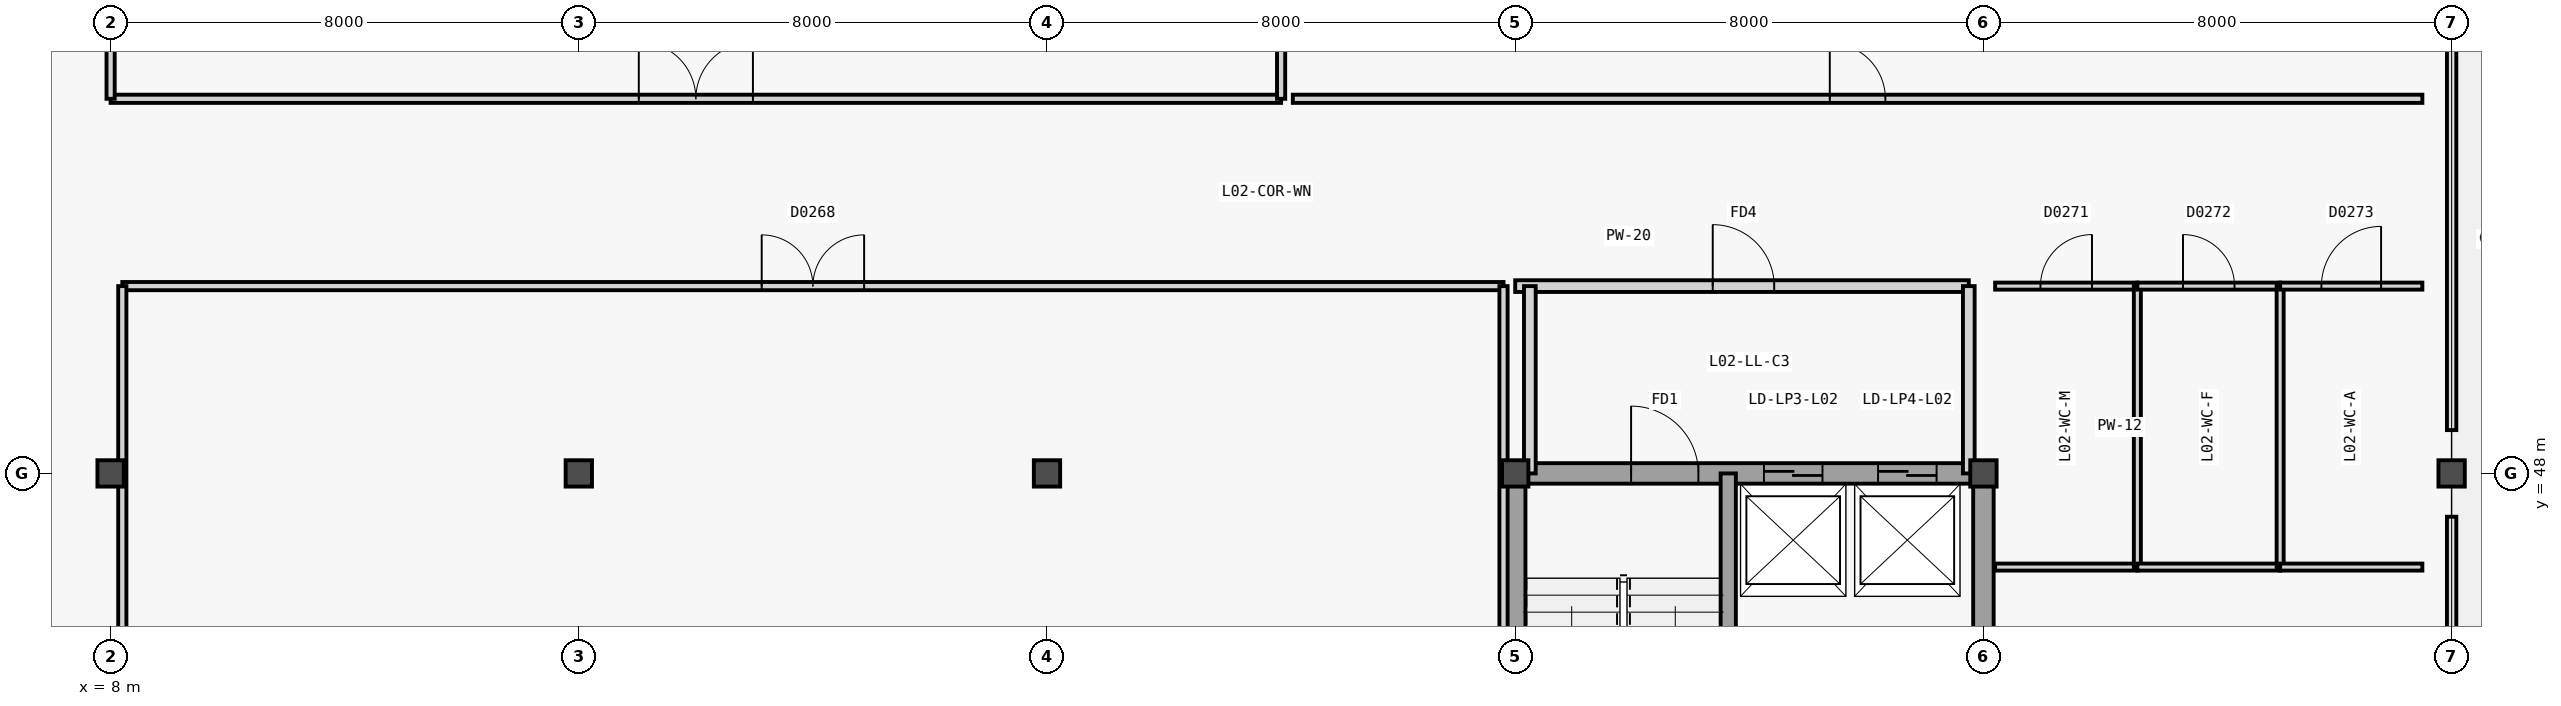
"""IFC4 building model, lengths in metres.
Left out: names, types, materials, properties, quantities, classifications, styles, units other than length and angle.
Written with IfcOpenShell. Run it as: python <this file> out.ifc"""

import sys

from ifc_helpers import new_model, si_unit, direction, frame, frame_2d, origin, origin_2d, place, context, subcontext, project, spatial, rectangle, extrude, element, fill, save


model = new_model("IFC4")
c1 = context("Model", 3, precision=1e-05, world=origin(), true_north=direction((0.0, 1.0)))
c2 = subcontext(c1, "Body", "Model", "MODEL_VIEW")
j1 = project(units=[si_unit("LENGTHUNIT", "METRE"), si_unit("PLANEANGLEUNIT", "RADIAN")], contexts=[c1])
p1 = place(None, origin())
s1 = spatial("IfcSite", under=j1, at=p1, CompositionType="ELEMENT")
p2 = place(p1, origin())
s2 = spatial("IfcBuilding", under=s1, at=p2, CompositionType="ELEMENT")
p3 = place(p2, frame((0.0, 0.0, 10.2)))
s3 = spatial("IfcBuildingStorey", under=s2, at=p3, CompositionType="ELEMENT", Elevation=10.2)
for number, where, z_axis, x_axis in (
    (1, (8.0, 48.0, 0.0), (0.0, 0.0, 1.0), (1.0, 0.0, 0.0)),
    (2, (16.0, 48.0, 0.0), (0.0, 0.0, 1.0), (1.0, 0.0, 0.0)),
    (3, (24.0, 48.0, 0.0), (0.0, 0.0, 1.0), (1.0, 0.0, 0.0)),
    (4, (32.0, 48.0, 0.0), (0.0, 0.0, 1.0), (1.0, 0.0, 0.0)),
    (5, (40.0, 48.0, 0.0), (0.0, 0.0, 1.0), (1.0, 0.0, 0.0)),
    (6, (48.0, 48.0, 0.0), (0.0, 0.0, 1.0), (1.0, 0.0, 0.0)),
):
    element("IfcColumn", number, at=place(p3, frame(where, z_axis=z_axis, x_axis=x_axis)), inside=s3, PredefinedType="COLUMN", context=c2, shape_type="SweptSolid", body=[
        extrude(rectangle(XDim=0.45, YDim=0.45, at=origin_2d()), origin(), (0.0, 0.0, 1.0), 4.2),
    ])
for number, where, z_axis, x_axis in (
    (7, (32.0, 40.0, 0.0), (0.0, 0.0, 1.0), (0.0, 1.0, 0.0)),
    (8, (40.0, 40.0, 0.0), (0.0, 0.0, 1.0), (0.0, 1.0, 0.0)),
):
    element("IfcWall", number, at=place(p3, frame(where, z_axis=z_axis, x_axis=x_axis)), inside=s3, PredefinedType="SHEAR", context=c2, shape_type="SweptSolid", body=[
        extrude(rectangle(XDim=8.0, YDim=0.35, at=frame_2d((4.0, 0.0))), origin(), (0.0, 0.0, 1.0), 4.2),
    ])
p4 = place(p3, frame((32.0, 48.0, 0.0), z_axis=(0.0, 0.0, 1.0), x_axis=(1.0, 0.0, 0.0)))
e9 = element("IfcWall", 9, at=p4, inside=s3, PredefinedType="SHEAR", context=c2, shape_type="SweptSolid", body=[
    extrude(rectangle(XDim=8.0, YDim=0.35, at=frame_2d((4.0, 0.0))), origin(), (0.0, 0.0, 1.0), 4.2),
])
p5 = place(p4, frame((1.98, 0.0, 0.0)))
e10 = element("IfcOpeningElement", 10, at=p5, cuts=e9, PredefinedType="OPENING", context=c2, shape_type="SweptSolid", body=[
    extrude(rectangle(XDim=1.15, YDim=2.2, at=frame_2d((0.575, 1.1))), frame((0.0, 0.185, 0.0), z_axis=(0.0, -1.0, 0.0), x_axis=(1.0, 0.0, 0.0)), (0.0, 0.0, 1.0), 0.37),
])
p6 = place(p4, frame((4.25, 0.0, 0.0)))
e11 = element("IfcOpeningElement", 11, at=p6, cuts=e9, PredefinedType="OPENING", context=c2, shape_type="SweptSolid", body=[
    extrude(rectangle(XDim=1.0, YDim=2.15, at=frame_2d((0.5, 1.075))), frame((0.0, 0.185, 0.0), z_axis=(0.0, -1.0, 0.0), x_axis=(1.0, 0.0, 0.0)), (0.0, 0.0, 1.0), 0.37),
])
p7 = place(p4, frame((6.2, 0.0, 0.0)))
e12 = element("IfcOpeningElement", 12, at=p7, cuts=e9, PredefinedType="OPENING", context=c2, shape_type="SweptSolid", body=[
    extrude(rectangle(XDim=1.0, YDim=2.15, at=frame_2d((0.5, 1.075))), frame((0.0, 0.185, 0.0), z_axis=(0.0, -1.0, 0.0), x_axis=(1.0, 0.0, 0.0)), (0.0, 0.0, 1.0), 0.37),
])
p8 = place(p3, frame((35.64, 40.0, 0.0), z_axis=(0.0, 0.0, 1.0), x_axis=(0.0, 1.0, 0.0)))
e13 = element("IfcWall", 13, at=p8, inside=s3, PredefinedType="SHEAR", context=c2, shape_type="SweptSolid", body=[
    extrude(rectangle(XDim=8.0, YDim=0.26, at=frame_2d((4.0, 0.0))), origin(), (0.0, 0.0, 1.0), 4.2),
])
p9 = place(p3, frame((32.0, 51.2, 0.0), z_axis=(0.0, 0.0, 1.0), x_axis=(1.0, 0.0, 0.0)))
e14 = element("IfcWall", 14, at=p9, inside=s3, PredefinedType="PARTITIONING", context=c2, shape_type="SweptSolid", body=[
    extrude(rectangle(XDim=7.75, YDim=0.2, at=frame_2d((3.875, 0.0))), origin(), (0.0, 0.0, 1.0), 3.92),
])
p10 = place(p9, frame((3.375, 0.0, 0.0)))
e15 = element("IfcOpeningElement", 15, at=p10, cuts=e14, PredefinedType="OPENING", context=c2, shape_type="SweptSolid", body=[
    extrude(rectangle(XDim=1.05, YDim=2.15, at=frame_2d((0.525, 1.075))), frame((0.0, 0.11, 0.0), z_axis=(0.0, -1.0, 0.0), x_axis=(1.0, 0.0, 0.0)), (0.0, 0.0, 1.0), 0.22),
])
for number, where, z_axis, x_axis in (
    (16, (39.75, 48.0, 0.0), (0.0, 0.0, 1.0), (0.0, 1.0, 0.0)),
    (17, (32.25, 48.0, 0.0), (0.0, 0.0, 1.0), (0.0, 1.0, 0.0)),
):
    element("IfcWall", number, at=place(p3, frame(where, z_axis=z_axis, x_axis=x_axis)), inside=s3, PredefinedType="PARTITIONING", context=c2, shape_type="SweptSolid", body=[
        extrude(rectangle(XDim=3.2, YDim=0.2, at=frame_2d((1.6, 0.0))), origin(), (0.0, 0.0, 1.0), 3.36),
    ])
p11 = place(p3, frame((8.2, 51.2, 0.0), z_axis=(0.0, 0.0, 1.0), x_axis=(1.0, 0.0, 0.0)))
e18 = element("IfcWall", 18, at=p11, inside=s3, PredefinedType="PARTITIONING", context=c2, shape_type="SweptSolid", body=[
    extrude(rectangle(XDim=23.6, YDim=0.14, at=frame_2d((11.8, 0.0))), origin(), (0.0, 0.0, 1.0), 3.94),
])
p12 = place(p11, frame((10.925, 0.0, 0.0)))
e19 = element("IfcOpeningElement", 19, at=p12, cuts=e18, PredefinedType="OPENING", context=c2, shape_type="SweptSolid", body=[
    extrude(rectangle(XDim=1.75, YDim=2.2, at=frame_2d((0.875, 1.1))), frame((0.0, 0.08, 0.0), z_axis=(0.0, -1.0, 0.0), x_axis=(1.0, 0.0, 0.0)), (0.0, 0.0, 1.0), 0.16),
])
for number, where, z_axis, x_axis in (
    (20, (8.2, 32.2, 0.0), (0.0, 0.0, 1.0), (0.0, 1.0, 0.0)),
    (21, (31.8, 32.2, 0.0), (0.0, 0.0, 1.0), (0.0, 1.0, 0.0)),
):
    element("IfcWall", number, at=place(p3, frame(where, z_axis=z_axis, x_axis=x_axis)), inside=s3, PredefinedType="PARTITIONING", context=c2, shape_type="SweptSolid", body=[
        extrude(rectangle(XDim=19.0, YDim=0.14, at=frame_2d((9.5, 0.0))), origin(), (0.0, 0.0, 1.0), 3.36),
    ])
p13 = place(p3, frame((8.0, 54.4, 0.0), z_axis=(0.0, 0.0, 1.0), x_axis=(1.0, 0.0, 0.0)))
e22 = element("IfcWall", 22, at=p13, inside=s3, PredefinedType="PARTITIONING", context=c2, shape_type="SweptSolid", body=[
    extrude(rectangle(XDim=20.0, YDim=0.14, at=frame_2d((10.0, 0.0))), origin(), (0.0, 0.0, 1.0), 3.94),
])
p14 = place(p13, frame((9.025, 0.0, 0.0)))
e23 = element("IfcOpeningElement", 23, at=p14, cuts=e22, PredefinedType="OPENING", context=c2, shape_type="SweptSolid", body=[
    extrude(rectangle(XDim=1.95, YDim=2.35, at=frame_2d((0.975, 1.175))), frame((0.0, 0.08, 0.0), z_axis=(0.0, -1.0, 0.0), x_axis=(1.0, 0.0, 0.0)), (0.0, 0.0, 1.0), 0.16),
])
p15 = place(p3, frame((8.0, 54.4, 0.0), z_axis=(0.0, 0.0, 1.0), x_axis=(0.0, 1.0, 0.0)))
e24 = element("IfcWall", 24, at=p15, inside=s3, PredefinedType="PARTITIONING", context=c2, shape_type="SweptSolid", body=[
    extrude(rectangle(XDim=9.1, YDim=0.14, at=frame_2d((4.55, 0.0))), origin(), (0.0, 0.0, 1.0), 3.36),
])
p16 = place(p3, frame((28.0, 54.4, 0.0), z_axis=(0.0, 0.0, 1.0), x_axis=(0.0, 1.0, 0.0)))
e25 = element("IfcWall", 25, at=p16, inside=s3, PredefinedType="PARTITIONING", context=c2, shape_type="SweptSolid", body=[
    extrude(rectangle(XDim=9.1, YDim=0.14, at=frame_2d((4.55, 0.0))), origin(), (0.0, 0.0, 1.0), 3.52),
])
p17 = place(p3, frame((28.2, 54.4, 0.0), z_axis=(0.0, 0.0, 1.0), x_axis=(1.0, 0.0, 0.0)))
e26 = element("IfcWall", 26, at=p17, inside=s3, PredefinedType="PARTITIONING", context=c2, shape_type="SweptSolid", body=[
    extrude(rectangle(XDim=19.3, YDim=0.14, at=frame_2d((9.65, 0.0))), origin(), (0.0, 0.0, 1.0), 3.94),
])
p18 = place(p17, frame((9.175, 0.0, 0.0)))
e27 = element("IfcOpeningElement", 27, at=p18, cuts=e26, PredefinedType="OPENING", context=c2, shape_type="SweptSolid", body=[
    extrude(rectangle(XDim=0.95, YDim=2.1, at=frame_2d((0.475, 1.05))), frame((0.0, 0.08, 0.0), z_axis=(0.0, -1.0, 0.0), x_axis=(1.0, 0.0, 0.0)), (0.0, 0.0, 1.0), 0.16),
])
p19 = place(p3, frame((40.2, 46.4, 0.0), z_axis=(0.0, 0.0, 1.0), x_axis=(1.0, 0.0, 0.0)))
e28 = element("IfcWall", 28, at=p19, inside=s3, PredefinedType="PARTITIONING", context=c2, shape_type="SweptSolid", body=[
    extrude(rectangle(XDim=2.43, YDim=0.12, at=frame_2d((1.215, 0.0))), origin(), (0.0, 0.0, 1.0), 3.94),
])
p20 = place(p3, frame((40.2, 51.2, 0.0), z_axis=(0.0, 0.0, 1.0), x_axis=(1.0, 0.0, 0.0)))
e29 = element("IfcWall", 29, at=p20, inside=s3, PredefinedType="PARTITIONING", context=c2, shape_type="SweptSolid", body=[
    extrude(rectangle(XDim=2.43, YDim=0.12, at=frame_2d((1.215, 0.0))), origin(), (0.0, 0.0, 1.0), 3.94),
])
p21 = place(p20, frame((0.775, 0.0, 0.0)))
e30 = element("IfcOpeningElement", 30, at=p21, cuts=e29, PredefinedType="OPENING", context=c2, shape_type="SweptSolid", body=[
    extrude(rectangle(XDim=0.88, YDim=2.1, at=frame_2d((0.44, 1.05))), frame((0.0, 0.07, 0.0), z_axis=(0.0, -1.0, 0.0), x_axis=(1.0, 0.0, 0.0)), (0.0, 0.0, 1.0), 0.14),
])
p22 = place(p3, frame((42.63, 46.4, 0.0), z_axis=(0.0, 0.0, 1.0), x_axis=(0.0, 1.0, 0.0)))
e31 = element("IfcWall", 31, at=p22, inside=s3, PredefinedType="PARTITIONING", context=c2, shape_type="SweptSolid", body=[
    extrude(rectangle(XDim=4.8, YDim=0.12, at=frame_2d((2.4, 0.0))), origin(), (0.0, 0.0, 1.0), 3.94),
])
p23 = place(p3, frame((42.63, 46.4, 0.0), z_axis=(0.0, 0.0, 1.0), x_axis=(1.0, 0.0, 0.0)))
e32 = element("IfcWall", 32, at=p23, inside=s3, PredefinedType="PARTITIONING", context=c2, shape_type="SweptSolid", body=[
    extrude(rectangle(XDim=2.44, YDim=0.12, at=frame_2d((1.22, 0.0))), origin(), (0.0, 0.0, 1.0), 3.94),
])
p24 = place(p3, frame((42.63, 51.2, 0.0), z_axis=(0.0, 0.0, 1.0), x_axis=(1.0, 0.0, 0.0)))
e33 = element("IfcWall", 33, at=p24, inside=s3, PredefinedType="PARTITIONING", context=c2, shape_type="SweptSolid", body=[
    extrude(rectangle(XDim=2.44, YDim=0.12, at=frame_2d((1.22, 0.0))), origin(), (0.0, 0.0, 1.0), 3.94),
])
p25 = place(p24, frame((0.78, 0.0, 0.0)))
e34 = element("IfcOpeningElement", 34, at=p25, cuts=e33, PredefinedType="OPENING", context=c2, shape_type="SweptSolid", body=[
    extrude(rectangle(XDim=0.88, YDim=2.1, at=frame_2d((0.44, 1.05))), frame((0.0, 0.07, 0.0), z_axis=(0.0, -1.0, 0.0), x_axis=(1.0, 0.0, 0.0)), (0.0, 0.0, 1.0), 0.14),
])
p26 = place(p3, frame((45.07, 46.4, 0.0), z_axis=(0.0, 0.0, 1.0), x_axis=(0.0, 1.0, 0.0)))
e35 = element("IfcWall", 35, at=p26, inside=s3, PredefinedType="PARTITIONING", context=c2, shape_type="SweptSolid", body=[
    extrude(rectangle(XDim=4.8, YDim=0.12, at=frame_2d((2.4, 0.0))), origin(), (0.0, 0.0, 1.0), 3.94),
])
p27 = place(p3, frame((45.07, 46.4, 0.0), z_axis=(0.0, 0.0, 1.0), x_axis=(1.0, 0.0, 0.0)))
e36 = element("IfcWall", 36, at=p27, inside=s3, PredefinedType="PARTITIONING", context=c2, shape_type="SweptSolid", body=[
    extrude(rectangle(XDim=2.43, YDim=0.12, at=frame_2d((1.215, 0.0))), origin(), (0.0, 0.0, 1.0), 3.94),
])
p28 = place(p3, frame((45.07, 51.2, 0.0), z_axis=(0.0, 0.0, 1.0), x_axis=(1.0, 0.0, 0.0)))
e37 = element("IfcWall", 37, at=p28, inside=s3, PredefinedType="PARTITIONING", context=c2, shape_type="SweptSolid", body=[
    extrude(rectangle(XDim=2.43, YDim=0.12, at=frame_2d((1.215, 0.0))), origin(), (0.0, 0.0, 1.0), 3.94),
])
p29 = place(p28, frame((0.705, 0.0, 0.0)))
e38 = element("IfcOpeningElement", 38, at=p29, cuts=e37, PredefinedType="OPENING", context=c2, shape_type="SweptSolid", body=[
    extrude(rectangle(XDim=1.02, YDim=2.1, at=frame_2d((0.51, 1.05))), frame((0.0, 0.07, 0.0), z_axis=(0.0, -1.0, 0.0), x_axis=(1.0, 0.0, 0.0)), (0.0, 0.0, 1.0), 0.14),
])
p30 = place(p5, origin())
e39 = element("IfcDoor", 39, at=p30, inside=s3, OperationType="SINGLE_SWING_LEFT", PredefinedType="DOOR", context=c2, shape_type="SweptSolid", body=[
    extrude(rectangle(XDim=1.15, YDim=2.2, at=frame_2d((0.575, 1.1))), frame((0.0, 0.025, 0.0), z_axis=(0.0, -1.0, 0.0), x_axis=(1.0, 0.0, 0.0)), (0.0, 0.0, 1.0), 0.05),
])
fill(e10, e39)
p31 = place(p6, origin())
e40 = element("IfcDoor", 40, at=p31, inside=s3, OperationType="DOUBLE_DOOR_SLIDING", PredefinedType="DOOR", context=c2, shape_type="SweptSolid", body=[
    extrude(rectangle(XDim=1.0, YDim=2.15, at=frame_2d((0.5, 1.075))), frame((0.0, 0.025, 0.0), z_axis=(0.0, -1.0, 0.0), x_axis=(1.0, 0.0, 0.0)), (0.0, 0.0, 1.0), 0.05),
])
fill(e11, e40)
p32 = place(p7, origin())
e41 = element("IfcDoor", 41, at=p32, inside=s3, OperationType="DOUBLE_DOOR_SLIDING", PredefinedType="DOOR", context=c2, shape_type="SweptSolid", body=[
    extrude(rectangle(XDim=1.0, YDim=2.15, at=frame_2d((0.5, 1.075))), frame((0.0, 0.025, 0.0), z_axis=(0.0, -1.0, 0.0), x_axis=(1.0, 0.0, 0.0)), (0.0, 0.0, 1.0), 0.05),
])
fill(e12, e41)
p33 = place(p10, origin())
e42 = element("IfcDoor", 42, at=p33, inside=s3, OperationType="SINGLE_SWING_LEFT", PredefinedType="DOOR", context=c2, shape_type="SweptSolid", body=[
    extrude(rectangle(XDim=1.05, YDim=2.15, at=frame_2d((0.525, 1.075))), frame((0.0, 0.025, 0.0), z_axis=(0.0, -1.0, 0.0), x_axis=(1.0, 0.0, 0.0)), (0.0, 0.0, 1.0), 0.05),
])
fill(e15, e42)
p34 = place(p12, origin())
e43 = element("IfcDoor", 43, at=p34, inside=s3, OperationType="DOUBLE_DOOR_SINGLE_SWING", PredefinedType="DOOR", context=c2, shape_type="SweptSolid", body=[
    extrude(rectangle(XDim=1.75, YDim=2.2, at=frame_2d((0.875, 1.1))), frame((0.0, 0.025, 0.0), z_axis=(0.0, -1.0, 0.0), x_axis=(1.0, 0.0, 0.0)), (0.0, 0.0, 1.0), 0.05),
])
fill(e19, e43)
p35 = place(p14, origin())
e44 = element("IfcDoor", 44, at=p35, inside=s3, OperationType="DOUBLE_DOOR_SINGLE_SWING", PredefinedType="DOOR", context=c2, shape_type="SweptSolid", body=[
    extrude(rectangle(XDim=1.95, YDim=2.35, at=frame_2d((0.975, 1.175))), frame((0.0, 0.025, 0.0), z_axis=(0.0, -1.0, 0.0), x_axis=(1.0, 0.0, 0.0)), (0.0, 0.0, 1.0), 0.05),
])
fill(e23, e44)
p36 = place(p18, origin())
e45 = element("IfcDoor", 45, at=p36, inside=s3, OperationType="SINGLE_SWING_LEFT", PredefinedType="DOOR", context=c2, shape_type="SweptSolid", body=[
    extrude(rectangle(XDim=0.95, YDim=2.1, at=frame_2d((0.475, 1.05))), frame((0.0, 0.025, 0.0), z_axis=(0.0, -1.0, 0.0), x_axis=(1.0, 0.0, 0.0)), (0.0, 0.0, 1.0), 0.05),
])
fill(e27, e45)
p37 = place(p21, origin())
e46 = element("IfcDoor", 46, at=p37, inside=s3, OperationType="SINGLE_SWING_RIGHT", PredefinedType="DOOR", context=c2, shape_type="SweptSolid", body=[
    extrude(rectangle(XDim=0.88, YDim=2.1, at=frame_2d((0.44, 1.05))), frame((0.0, 0.025, 0.0), z_axis=(0.0, -1.0, 0.0), x_axis=(1.0, 0.0, 0.0)), (0.0, 0.0, 1.0), 0.05),
])
fill(e30, e46)
p38 = place(p25, origin())
e47 = element("IfcDoor", 47, at=p38, inside=s3, OperationType="SINGLE_SWING_LEFT", PredefinedType="DOOR", context=c2, shape_type="SweptSolid", body=[
    extrude(rectangle(XDim=0.88, YDim=2.1, at=frame_2d((0.44, 1.05))), frame((0.0, 0.025, 0.0), z_axis=(0.0, -1.0, 0.0), x_axis=(1.0, 0.0, 0.0)), (0.0, 0.0, 1.0), 0.05),
])
fill(e34, e47)
p39 = place(p29, origin())
e48 = element("IfcDoor", 48, at=p39, inside=s3, OperationType="SINGLE_SWING_RIGHT", PredefinedType="DOOR", context=c2, shape_type="SweptSolid", body=[
    extrude(rectangle(XDim=1.02, YDim=2.1, at=frame_2d((0.51, 1.05))), frame((0.0, 0.025, 0.0), z_axis=(0.0, -1.0, 0.0), x_axis=(1.0, 0.0, 0.0)), (0.0, 0.0, 1.0), 0.05),
])
fill(e38, e48)
save(model, sys.argv[1])
